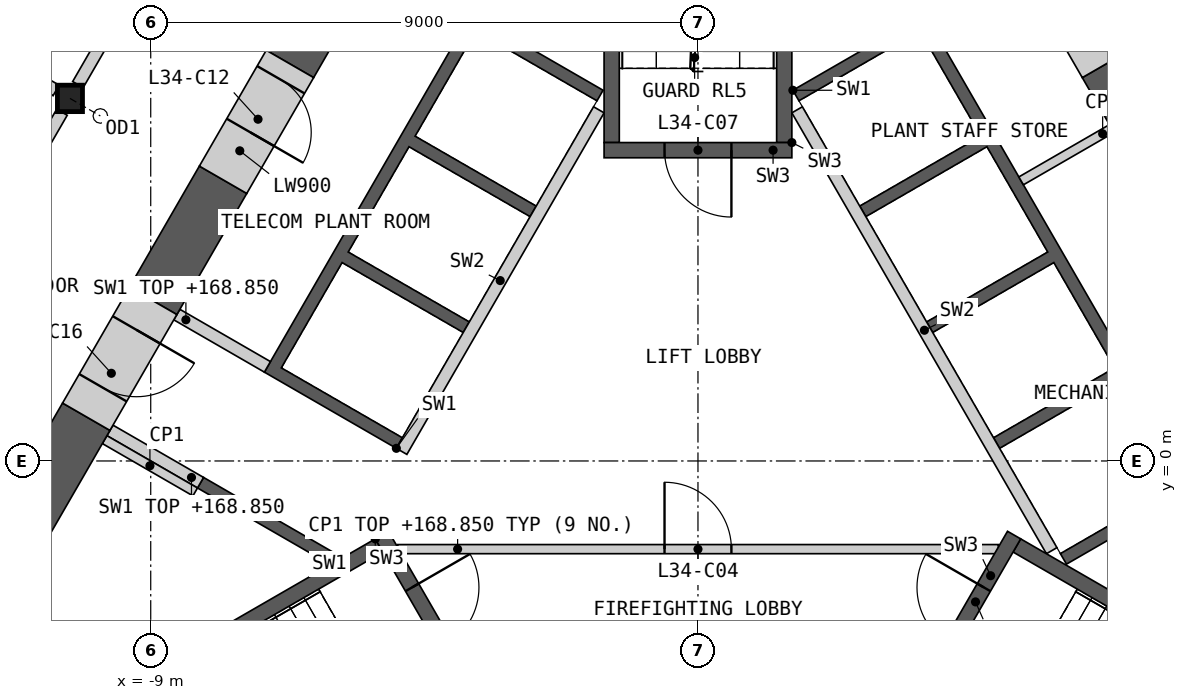
"""IFC4 building model, lengths in metres.
Left out: names, types, materials, properties, quantities, classifications, styles, units other than length and angle.
Written with IfcOpenShell. Run it as: python <this file> out.ifc"""

import sys

from ifc_helpers import new_model, si_unit, direction, frame, frame_2d, origin, origin_2d, place, context, subcontext, project, spatial, polyline, rectangle, i_section, outline, extrude, element, fill, save


model = new_model("IFC4")
c1 = context("Model", 3, precision=1e-05, world=origin(), true_north=direction((0.0, 1.0)))
c2 = subcontext(c1, "Body", "Model", "MODEL_VIEW")
j1 = project(units=[si_unit("LENGTHUNIT", "METRE"), si_unit("PLANEANGLEUNIT", "RADIAN")], contexts=[c1])
p1 = place(None, origin())
s1 = spatial("IfcSite", under=j1, at=p1, CompositionType="ELEMENT")
p2 = place(p1, origin())
s2 = spatial("IfcBuilding", under=s1, at=p2, CompositionType="ELEMENT")
p3 = place(p2, frame((0.0, 0.0, 164.2)))
s3 = spatial("IfcBuildingStorey", under=s2, at=p3, CompositionType="ELEMENT", Elevation=164.2)
p4 = place(p3, frame((-10.328, 5.963, 0.0), z_axis=(0.099340040995, -0.057333949442, 0.993400409954), x_axis=(0.499868889286, 0.866101087359, 0.0)))
e1 = element("IfcColumn", 1, at=p4, inside=s3, PredefinedType="COLUMN", context=c2, shape_type="SweptSolid", body=[
    extrude(i_section(OverallWidth=0.412, OverallDepth=0.435, WebThickness=0.036, FlangeThickness=0.057, at=origin_2d()), frame((0.0, 0.0, 0.025)), (0.0, 0.0, 1.0), 4.983),
])
p5 = place(p3, origin())
e2 = element("IfcWall", 2, at=p5, inside=s3, PredefinedType="SHEAR", context=c2, shape_type="SweptSolid", body=[
    extrude(outline(polyline([(1.561, 6.097), (3.731, 7.35), (8.231, -0.444), (6.061, -1.697), (5.96, -1.524), (7.952, -0.374), (6.952, 1.358), (4.96, 0.208), (4.861, 0.381), (6.852, 1.531), (5.852, 3.263), (3.861, 2.113), (3.76, 2.287), (5.752, 3.437), (4.752, 5.169), (2.76, 4.019), (2.66, 4.192), (4.652, 5.342), (3.652, 7.074), (1.66, 5.924), (1.561, 6.097)])), origin(), (0.0, 0.0, 1.0), 4.65),
])
p6 = place(p3, frame((5.817, -1.476, 0.0), z_axis=(0.0, 0.0, 1.0), x_axis=(-0.500002616675, 0.866023893041, 0.0)))
e3 = element("IfcWall", 3, at=p6, inside=s3, PredefinedType="SOLIDWALL", context=c2, shape_type="SweptSolid", body=[
    extrude(rectangle(XDim=8.373, YDim=0.2, at=frame_2d((4.187, 0.0))), origin(), (0.0, 0.0, 1.0), 4.65),
])
p7 = place(p3, origin())
e4 = element("IfcWall", 4, at=p7, inside=s3, PredefinedType="SHEAR", context=c2, shape_type="SweptSolid", body=[
    extrude(outline(polyline([(-6.061, -1.697), (-8.231, -0.444), (-8.131, -0.271), (-5.96, -1.524), (-6.061, -1.697)])), origin(), (0.0, 0.0, 1.0), 4.65),
])
p8 = place(p3, origin())
e5 = element("IfcWall", 5, at=p8, inside=s3, PredefinedType="SHEAR", context=c2, shape_type="SweptSolid", body=[
    extrude(outline(polyline([(-4.96, 0.208), (-7.131, 1.461), (-3.731, 7.35), (-1.561, 6.097), (-1.66, 5.924), (-3.652, 7.074), (-4.652, 5.342), (-2.66, 4.192), (-2.76, 4.019), (-4.752, 5.169), (-5.752, 3.437), (-3.76, 2.287), (-3.861, 2.113), (-5.852, 3.263), (-6.852, 1.531), (-4.861, 0.381), (-4.96, 0.208)])), origin(), (0.0, 0.0, 1.0), 4.65),
])
p9 = place(p3, frame((-1.631, 5.776, 0.0), z_axis=(0.0, 0.0, 1.0), x_axis=(-0.499992876559, -0.866029516466, 0.0)))
e6 = element("IfcWall", 6, at=p9, inside=s3, PredefinedType="SOLIDWALL", context=c2, shape_type="SweptSolid", body=[
    extrude(rectangle(XDim=6.486, YDim=0.2, at=frame_2d((3.243, 0.0))), origin(), (0.0, 0.0, 1.0), 4.65),
])
for number, where, z_axis, x_axis in (
    (7, (-7.081, 1.548, 0.0), (0.0, 0.0, 1.0), (-0.866, 0.5, 0.0)),
    (8, (-8.181, -0.357, 0.0), (0.0, 0.0, 1.0), (-0.866, 0.5, 0.0)),
):
    element("IfcWall", number, at=place(p3, frame(where, z_axis=z_axis, x_axis=x_axis)), inside=s3, PredefinedType="SHEAR", context=c2, shape_type="SweptSolid", body=[
        extrude(rectangle(XDim=1.72, YDim=0.2, at=frame_2d((0.86, 0.0))), origin(), (0.0, 0.0, 1.0), 4.65),
    ])
p10 = place(p3, frame((-4.941, -1.45, 0.0), z_axis=(0.0, 0.0, 1.0), x_axis=(1.0, 0.0, 0.0)))
e9 = element("IfcWall", 9, at=p10, inside=s3, PredefinedType="PARTITIONING", context=c2, shape_type="SweptSolid", body=[
    extrude(rectangle(XDim=9.882, YDim=0.15, at=frame_2d((4.941, 0.0))), origin(), (0.0, 0.0, 1.0), 4.65),
])
p11 = place(p10, frame((4.391, 0.0, 0.0)))
e10 = element("IfcOpeningElement", 10, at=p11, cuts=e9, PredefinedType="OPENING", context=c2, shape_type="SweptSolid", body=[
    extrude(rectangle(XDim=1.1, YDim=2.1, at=frame_2d((0.55, 1.05))), frame((0.0, 0.085, 0.0), z_axis=(0.0, -1.0, 0.0), x_axis=(1.0, 0.0, 0.0)), (0.0, 0.0, 1.0), 0.17),
])
p12 = place(p3, origin())
e11 = element("IfcWall", 11, at=p12, inside=s3, PredefinedType="SHEAR", context=c2, shape_type="SweptSolid", body=[
    extrude(outline(polyline([(-5.307, -1.281), (-10.374, -4.206), (-10.032, -4.298), (-5.182, -1.498), (-5.307, -1.281)])), origin(), (0.0, 0.0, 1.0), 4.65),
])
p13 = place(p3, frame((-5.199, -1.219, 0.0), z_axis=(0.0, 0.0, 1.0), x_axis=(0.499982516597, -0.866035497597, 0.0)))
e12 = element("IfcWall", 12, at=p13, inside=s3, PredefinedType="SHEAR", context=c2, shape_type="SweptSolid", body=[
    extrude(rectangle(XDim=3.088, YDim=0.25, at=frame_2d((1.544, 0.0))), origin(), (0.0, 0.0, 1.0), 4.65),
])
p14 = place(p13, frame((0.994, 0.0, 0.0)))
e13 = element("IfcOpeningElement", 13, at=p14, cuts=e12, PredefinedType="OPENING", context=c2, shape_type="SweptSolid", body=[
    extrude(rectangle(XDim=1.1, YDim=2.1, at=frame_2d((0.55, 1.05))), frame((0.0, 0.135, 0.0), z_axis=(0.0, -1.0, 0.0), x_axis=(1.0, 0.0, 0.0)), (0.0, 0.0, 1.0), 0.27),
])
p15 = place(p3, origin())
e14 = element("IfcWall", 14, at=p15, inside=s3, PredefinedType="SHEAR", context=c2, shape_type="SweptSolid", body=[
    extrude(outline(polyline([(10.032, -4.298), (10.374, -4.206), (5.307, -1.281), (5.182, -1.498), (10.032, -4.298)])), origin(), (0.0, 0.0, 1.0), 4.65),
])
p16 = place(p3, frame((3.655, -3.893, 0.0), z_axis=(0.0, 0.0, 1.0), x_axis=(0.499982516597, 0.866035497597, 0.0)))
e15 = element("IfcWall", 15, at=p16, inside=s3, PredefinedType="SHEAR", context=c2, shape_type="SweptSolid", body=[
    extrude(rectangle(XDim=3.088, YDim=0.25, at=frame_2d((1.544, 0.0))), origin(), (0.0, 0.0, 1.0), 4.65),
])
p17 = place(p16, frame((0.994, 0.0, 0.0)))
e16 = element("IfcOpeningElement", 16, at=p17, cuts=e15, PredefinedType="OPENING", context=c2, shape_type="SweptSolid", body=[
    extrude(rectangle(XDim=1.1, YDim=2.1, at=frame_2d((0.55, 1.05))), frame((0.0, 0.135, 0.0), z_axis=(0.0, -1.0, 0.0), x_axis=(1.0, 0.0, 0.0)), (0.0, 0.0, 1.0), 0.27),
])
p18 = place(p3, origin())
e17 = element("IfcWall", 17, at=p18, inside=s3, PredefinedType="SHEAR", context=c2, shape_type="SweptSolid", body=[
    extrude(outline(polyline([(1.544, 5.237), (1.544, 11.087), (1.294, 10.837), (1.294, 5.237), (1.544, 5.237)])), origin(), (0.0, 0.0, 1.0), 4.65),
])
p19 = place(p3, origin())
e18 = element("IfcWall", 18, at=p19, inside=s3, PredefinedType="SHEAR", context=c2, shape_type="SweptSolid", body=[
    extrude(outline(polyline([(-1.294, 10.837), (-1.544, 11.087), (-1.544, 5.237), (-1.294, 5.237), (-1.294, 10.837)])), origin(), (0.0, 0.0, 1.0), 4.65),
])
p20 = place(p3, frame((1.544, 5.112, 0.0), z_axis=(0.0, 0.0, 1.0), x_axis=(-1.0, 0.0, 0.0)))
e19 = element("IfcWall", 19, at=p20, inside=s3, PredefinedType="SHEAR", context=c2, shape_type="SweptSolid", body=[
    extrude(rectangle(XDim=3.088, YDim=0.25, at=frame_2d((1.544, 0.0))), origin(), (0.0, 0.0, 1.0), 4.65),
])
p21 = place(p20, frame((0.994, 0.0, 0.0)))
e20 = element("IfcOpeningElement", 20, at=p21, cuts=e19, PredefinedType="OPENING", context=c2, shape_type="SweptSolid", body=[
    extrude(rectangle(XDim=1.1, YDim=2.1, at=frame_2d((0.55, 1.05))), frame((0.0, 0.135, 0.0), z_axis=(0.0, -1.0, 0.0), x_axis=(1.0, 0.0, 0.0)), (0.0, 0.0, 1.0), 0.27),
])
for number, where, z_axis, x_axis in (
    (21, (-8.268, -0.509, 0.0), (0.0, 0.0, 1.0), (-0.866, 0.5, 0.0)),
    (22, (6.804, 5.467, 0.0), (0.0, 0.0, 1.0), (-0.866, -0.5, 0.0)),
):
    element("IfcWall", number, at=place(p3, frame(where, z_axis=z_axis, x_axis=x_axis)), inside=s3, PredefinedType="PARTITIONING", context=c2, shape_type="SweptSolid", body=[
        extrude(rectangle(XDim=1.72, YDim=0.15, at=frame_2d((0.86, 0.0))), origin(), (0.0, 0.0, 1.0), 4.65),
    ])
p22 = place(p3, frame((8.121, 4.087, 0.0), z_axis=(0.0, 0.0, 1.0), x_axis=(-0.50009448556, 0.865970845648, 0.0)))
e23 = element("IfcWall", 23, at=p22, inside=s3, PredefinedType="SHEAR", context=c2, shape_type="SweptSolid", body=[
    extrude(rectangle(XDim=2.821, YDim=0.9, at=frame_2d((1.411, 0.0))), origin(), (0.0, 0.0, 1.0), 4.65),
])
p23 = place(p3, frame((-10.06, 0.728, 0.0), z_axis=(0.0, 0.0, 1.0), x_axis=(-0.499995114243, -0.866028224559, 0.0)))
e24 = element("IfcWall", 24, at=p23, inside=s3, PredefinedType="SHEAR", context=c2, shape_type="SweptSolid", body=[
    extrude(rectangle(XDim=10.541, YDim=0.9, at=frame_2d((5.271, 0.0))), origin(), (0.0, 0.0, 1.0), 4.65),
])
p24 = place(p3, frame((-4.303, 10.699, 0.0), z_axis=(0.0, 0.0, 1.0), x_axis=(-0.500000460299, -0.866025138031, 0.0)))
e25 = element("IfcWall", 25, at=p24, inside=s3, PredefinedType="SHEAR", context=c2, shape_type="SweptSolid", body=[
    extrude(rectangle(XDim=4.814, YDim=0.9, at=frame_2d((2.407, 0.0))), origin(), (0.0, 0.0, 1.0), 4.65),
])
p25 = place(p3, frame((-7.81, 4.625, 0.0), z_axis=(0.0, 0.0, 1.0), x_axis=(-0.499952165731, -0.866053019151, 0.0)))
e26 = element("IfcWall", 26, at=p25, inside=s3, PredefinedType="SHEAR", context=c2, shape_type="SweptSolid", body=[
    extrude(rectangle(XDim=2.3, YDim=0.9, at=frame_2d((1.15, 0.0))), origin(), (0.0, 0.0, 1.0), 4.65),
])
p26 = place(p3, frame((-6.71, 6.53, 0.0), z_axis=(0.0, 0.0, 1.0), x_axis=(-0.50002983664, -0.866008176907, 0.0)))
e27 = element("IfcWall", 27, at=p26, inside=s3, PredefinedType="SHEAR", context=c2, shape_type="SweptSolid", body=[
    extrude(rectangle(XDim=2.2, YDim=0.9, at=frame_2d((1.1, 0.0))), origin(), (0.0, 0.0, 1.0), 4.65),
])
p27 = place(p26, frame((0.3, 0.0, 0.0)))
e28 = element("IfcOpeningElement", 28, at=p27, cuts=e27, PredefinedType="OPENING", context=c2, shape_type="SweptSolid", body=[
    extrude(rectangle(XDim=1.0, YDim=2.1, at=frame_2d((0.5, 1.05))), frame((0.0, 0.46, 0.0), z_axis=(0.0, -1.0, 0.0), x_axis=(1.0, 0.0, 0.0)), (0.0, 0.0, 1.0), 0.92),
])
p28 = place(p3, frame((6.71, 6.53, 0.0), z_axis=(0.0, 0.0, 1.0), x_axis=(-0.499898558967, 0.866083962871, 0.0)))
e29 = element("IfcWall", 29, at=p28, inside=s3, PredefinedType="SHEAR", context=c2, shape_type="SweptSolid", body=[
    extrude(rectangle(XDim=2.2, YDim=0.9, at=frame_2d((1.1, 0.0))), origin(), (0.0, 0.0, 1.0), 4.65),
])
p29 = place(p28, frame((0.6, 0.0, 0.0)))
e30 = element("IfcOpeningElement", 30, at=p29, cuts=e29, PredefinedType="OPENING", context=c2, shape_type="SweptSolid", body=[
    extrude(rectangle(XDim=1.0, YDim=2.1, at=frame_2d((0.5, 1.05))), frame((0.0, 0.46, 0.0), z_axis=(0.0, -1.0, 0.0), x_axis=(1.0, 0.0, 0.0)), (0.0, 0.0, 1.0), 0.92),
])
p30 = place(p3, frame((-8.96, 2.633, 0.0), z_axis=(0.0, 0.0, 1.0), x_axis=(-0.50002983664, -0.866008176907, 0.0)))
e31 = element("IfcWall", 31, at=p30, inside=s3, PredefinedType="SHEAR", context=c2, shape_type="SweptSolid", body=[
    extrude(rectangle(XDim=2.2, YDim=0.9, at=frame_2d((1.1, 0.0))), origin(), (0.0, 0.0, 1.0), 4.65),
])
p31 = place(p30, frame((0.55, 0.0, 0.0)))
e32 = element("IfcOpeningElement", 32, at=p31, cuts=e31, PredefinedType="OPENING", context=c2, shape_type="SweptSolid", body=[
    extrude(rectangle(XDim=1.1, YDim=2.1, at=frame_2d((0.55, 1.05))), frame((0.0, 0.46, 0.0), z_axis=(0.0, -1.0, 0.0), x_axis=(1.0, 0.0, 0.0)), (0.0, 0.0, 1.0), 0.92),
])
p32 = place(p3, frame((-15.361, -2.754, 0.0), z_axis=(0.0, 0.0, 1.0), x_axis=(0.500004141693, 0.866023012564, 0.0)))
e33 = element("IfcWall", 33, at=p32, inside=s3, PredefinedType="PARTITIONING", context=c2, shape_type="SweptSolid", body=[
    extrude(rectangle(XDim=9.803, YDim=0.2, at=frame_2d((4.902, 0.0))), origin(), (0.0, 0.0, 1.0), 4.65),
])
p33 = place(p32, frame((4.302, 0.0, 0.0)))
e34 = element("IfcOpeningElement", 34, at=p33, cuts=e33, PredefinedType="OPENING", context=c2, shape_type="SweptSolid", body=[
    extrude(rectangle(XDim=1.2, YDim=2.1, at=frame_2d((0.6, 1.05))), frame((0.0, 0.11, 0.0), z_axis=(0.0, -1.0, 0.0), x_axis=(1.0, 0.0, 0.0)), (0.0, 0.0, 1.0), 0.22),
])
p34 = place(p3, frame((-10.197, 6.19, 0.0), z_axis=(0.0, 0.0, 1.0), x_axis=(0.500012035596, 0.866018454918, 0.0)))
e35 = element("IfcWall", 35, at=p34, inside=s3, PredefinedType="PARTITIONING", context=c2, shape_type="SweptSolid", body=[
    extrude(rectangle(XDim=9.803, YDim=0.2, at=frame_2d((4.902, 0.0))), origin(), (0.0, 0.0, 1.0), 4.65),
])
p35 = place(p34, frame((4.302, 0.0, 0.0)))
e36 = element("IfcOpeningElement", 36, at=p35, cuts=e35, PredefinedType="OPENING", context=c2, shape_type="SweptSolid", body=[
    extrude(rectangle(XDim=1.2, YDim=2.1, at=frame_2d((0.6, 1.05))), frame((0.0, 0.11, 0.0), z_axis=(0.0, -1.0, 0.0), x_axis=(1.0, 0.0, 0.0)), (0.0, 0.0, 1.0), 0.22),
])
p36 = place(p3, frame((5.295, 14.68, 0.0), z_axis=(0.0, 0.0, 1.0), x_axis=(0.500012035596, -0.866018454918, 0.0)))
e37 = element("IfcWall", 37, at=p36, inside=s3, PredefinedType="PARTITIONING", context=c2, shape_type="SweptSolid", body=[
    extrude(rectangle(XDim=9.803, YDim=0.2, at=frame_2d((4.902, 0.0))), origin(), (0.0, 0.0, 1.0), 4.65),
])
p37 = place(p36, frame((4.302, 0.0, 0.0)))
e38 = element("IfcOpeningElement", 38, at=p37, cuts=e37, PredefinedType="OPENING", context=c2, shape_type="SweptSolid", body=[
    extrude(rectangle(XDim=1.2, YDim=2.1, at=frame_2d((0.6, 1.05))), frame((0.0, 0.11, 0.0), z_axis=(0.0, -1.0, 0.0), x_axis=(1.0, 0.0, 0.0)), (0.0, 0.0, 1.0), 0.22),
])
p38 = place(p3, frame((-21.536, 12.434, 0.0), z_axis=(0.0, 0.0, 1.0), x_axis=(0.86602461759, -0.500001361726, 0.0)))
e39 = element("IfcWall", 39, at=p38, inside=s3, PredefinedType="PARTITIONING", context=c2, shape_type="SweptSolid", body=[
    extrude(rectangle(XDim=12.679, YDim=0.2, at=frame_2d((6.34, 0.0))), origin(), (0.0, 0.0, 1.0), 4.65),
])
p39 = place(p11, origin())
e40 = element("IfcDoor", 40, at=p39, inside=s3, OperationType="SINGLE_SWING_LEFT", PredefinedType="DOOR", context=c2, shape_type="SweptSolid", body=[
    extrude(rectangle(XDim=1.1, YDim=2.1, at=frame_2d((0.55, 1.05))), frame((0.0, 0.025, 0.0), z_axis=(0.0, -1.0, 0.0), x_axis=(1.0, 0.0, 0.0)), (0.0, 0.0, 1.0), 0.05),
])
fill(e10, e40)
p40 = place(p14, origin())
e41 = element("IfcDoor", 41, at=p40, inside=s3, OperationType="SINGLE_SWING_LEFT", PredefinedType="DOOR", context=c2, shape_type="SweptSolid", body=[
    extrude(rectangle(XDim=1.1, YDim=2.1, at=frame_2d((0.55, 1.05))), frame((0.0, 0.025, 0.0), z_axis=(0.0, -1.0, 0.0), x_axis=(1.0, 0.0, 0.0)), (0.0, 0.0, 1.0), 0.05),
])
fill(e13, e41)
p41 = place(p17, origin())
e42 = element("IfcDoor", 42, at=p41, inside=s3, OperationType="SINGLE_SWING_RIGHT", PredefinedType="DOOR", context=c2, shape_type="SweptSolid", body=[
    extrude(rectangle(XDim=1.1, YDim=2.1, at=frame_2d((0.55, 1.05))), frame((0.0, 0.025, 0.0), z_axis=(0.0, -1.0, 0.0), x_axis=(1.0, 0.0, 0.0)), (0.0, 0.0, 1.0), 0.05),
])
fill(e16, e42)
p42 = place(p21, origin())
e43 = element("IfcDoor", 43, at=p42, inside=s3, OperationType="SINGLE_SWING_LEFT", PredefinedType="DOOR", context=c2, shape_type="SweptSolid", body=[
    extrude(rectangle(XDim=1.1, YDim=2.1, at=frame_2d((0.55, 1.05))), frame((0.0, 0.025, 0.0), z_axis=(0.0, -1.0, 0.0), x_axis=(1.0, 0.0, 0.0)), (0.0, 0.0, 1.0), 0.05),
])
fill(e20, e43)
p43 = place(p27, origin())
e44 = element("IfcDoor", 44, at=p43, inside=s3, OperationType="SINGLE_SWING_RIGHT", PredefinedType="DOOR", context=c2, shape_type="SweptSolid", body=[
    extrude(rectangle(XDim=1.0, YDim=2.1, at=frame_2d((0.5, 1.05))), frame((0.0, 0.205, 0.0), z_axis=(0.0, -1.0, 0.0), x_axis=(1.0, 0.0, 0.0)), (0.0, 0.0, 1.0), 0.05),
])
fill(e28, e44)
p44 = place(p31, origin())
e45 = element("IfcDoor", 45, at=p44, inside=s3, OperationType="SINGLE_SWING_LEFT", PredefinedType="DOOR", context=c2, shape_type="SweptSolid", body=[
    extrude(rectangle(XDim=1.1, YDim=2.1, at=frame_2d((0.55, 1.05))), frame((0.0, 0.205, 0.0), z_axis=(0.0, -1.0, 0.0), x_axis=(1.0, 0.0, 0.0)), (0.0, 0.0, 1.0), 0.05),
])
fill(e32, e45)
save(model, sys.argv[1])
